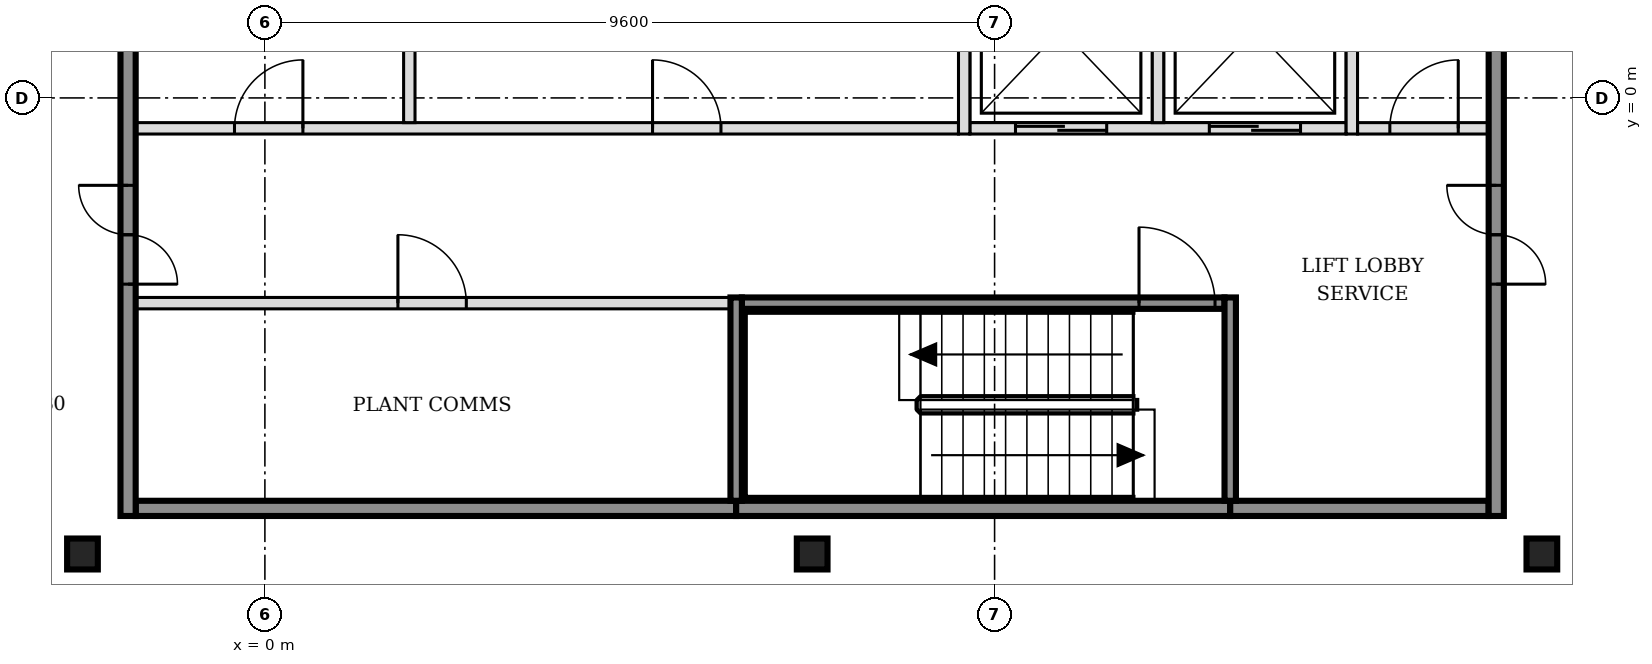
"""IFC4 building model, lengths in metres.
Left out: names, types, materials, properties, quantities, classifications, styles, units other than length and angle.
Written with IfcOpenShell. Run it as: python <this file> out.ifc"""

import sys

from ifc_helpers import new_model, si_unit, direction, frame, frame_2d, origin, origin_2d, place, context, subcontext, project, spatial, rectangle, i_section, extrude, element, fill, save


model = new_model("IFC4")
c1 = context("Model", 3, precision=1e-05, world=origin(), true_north=direction((0.0, 1.0)))
c2 = subcontext(c1, "Body", "Model", "MODEL_VIEW")
j1 = project(units=[si_unit("LENGTHUNIT", "METRE"), si_unit("PLANEANGLEUNIT", "RADIAN")], contexts=[c1])
p1 = place(None, origin())
s1 = spatial("IfcSite", under=j1, at=p1, CompositionType="ELEMENT")
p2 = place(p1, origin())
s2 = spatial("IfcBuilding", under=s1, at=p2, CompositionType="ELEMENT")
p3 = place(p2, frame((0.0, 0.0, 214.2)))
s3 = spatial("IfcBuildingStorey", under=s2, at=p3, CompositionType="ELEMENT", Elevation=214.2)
for number, where, z_axis, x_axis in (
    (1, (-2.4, -6.0, -0.15), (0.0, 0.0, 1.0), (1.0, 0.0, 0.0)),
    (2, (7.2, -6.0, -0.15), (0.0, 0.0, 1.0), (1.0, 0.0, 0.0)),
    (3, (16.8, -6.0, -0.15), (0.0, 0.0, 1.0), (1.0, 0.0, 0.0)),
):
    element("IfcColumn", number, at=place(p3, frame(where, z_axis=z_axis, x_axis=x_axis)), inside=s3, PredefinedType="COLUMN", context=c2, shape_type="SweptSolid", body=[
        extrude(i_section(OverallWidth=0.404, OverallDepth=0.407, WebThickness=0.027, FlangeThickness=0.044, FilletRadius=0.015, at=origin_2d()), origin(), (0.0, 0.0, 1.0), 3.6),
    ])
p4 = place(p3, frame((-1.7, -5.4, 0.0), z_axis=(0.0, 0.0, 1.0), x_axis=(1.0, 0.0, 0.0)))
e4 = element("IfcWall", 4, at=p4, inside=s3, PredefinedType="SOLIDWALL", context=c2, shape_type="SweptSolid", body=[
    extrude(rectangle(XDim=7.9, YDim=0.2, at=frame_2d((3.95, 0.0))), origin(), (0.0, 0.0, 1.0), 3.45),
])
p5 = place(p3, frame((6.2, -5.4, 0.0), z_axis=(0.0, 0.0, 1.0), x_axis=(1.0, 0.0, 0.0)))
e5 = element("IfcWall", 5, at=p5, inside=s3, PredefinedType="SOLIDWALL", context=c2, shape_type="SweptSolid", body=[
    extrude(rectangle(XDim=6.5, YDim=0.2, at=frame_2d((3.25, 0.0))), origin(), (0.0, 0.0, 1.0), 3.45),
])
p6 = place(p3, frame((12.7, -5.4, 0.0), z_axis=(0.0, 0.0, 1.0), x_axis=(1.0, 0.0, 0.0)))
e6 = element("IfcWall", 6, at=p6, inside=s3, PredefinedType="SOLIDWALL", context=c2, shape_type="SweptSolid", body=[
    extrude(rectangle(XDim=3.4, YDim=0.2, at=frame_2d((1.7, 0.0))), origin(), (0.0, 0.0, 1.0), 3.45),
])
p7 = place(p3, frame((-1.7, -2.7, 0.0), z_axis=(0.0, 0.0, 1.0), x_axis=(1.0, 0.0, 0.0)))
e7 = element("IfcWall", 7, at=p7, inside=s3, PredefinedType="PARTITIONING", context=c2, shape_type="SweptSolid", body=[
    extrude(rectangle(XDim=7.825, YDim=0.15, at=frame_2d((3.913, 0.0))), origin(), (0.0, 0.0, 1.0), 3.45),
])
p8 = place(p7, frame((3.45, 0.0, 0.0)))
e8 = element("IfcOpeningElement", 8, at=p8, cuts=e7, PredefinedType="OPENING", context=c2, shape_type="SweptSolid", body=[
    extrude(rectangle(XDim=0.9, YDim=2.1, at=frame_2d((0.45, 1.05))), frame((0.0, 0.085, 0.0), z_axis=(0.0, -1.0, 0.0), x_axis=(1.0, 0.0, 0.0)), (0.0, 0.0, 1.0), 0.17),
])
p9 = place(p3, frame((6.275, -2.7, 0.0), z_axis=(0.0, 0.0, 1.0), x_axis=(1.0, 0.0, 0.0)))
e9 = element("IfcWall", 9, at=p9, inside=s3, PredefinedType="SOLIDWALL", context=c2, shape_type="SweptSolid", body=[
    extrude(rectangle(XDim=6.35, YDim=0.15, at=frame_2d((3.175, 0.0))), origin(), (0.0, 0.0, 1.0), 3.45),
])
p10 = place(p9, frame((5.225, 0.0, 0.0)))
e10 = element("IfcOpeningElement", 10, at=p10, cuts=e9, PredefinedType="OPENING", context=c2, shape_type="SweptSolid", body=[
    extrude(rectangle(XDim=1.0, YDim=2.1, at=frame_2d((0.5, 1.05))), frame((0.0, 0.085, 0.0), z_axis=(0.0, -1.0, 0.0), x_axis=(1.0, 0.0, 0.0)), (0.0, 0.0, 1.0), 0.17),
])
p11 = place(p3, frame((-1.7, -0.4, 0.0), z_axis=(0.0, 0.0, 1.0), x_axis=(1.0, 0.0, 0.0)))
e11 = element("IfcWall", 11, at=p11, inside=s3, PredefinedType="PARTITIONING", context=c2, shape_type="SweptSolid", body=[
    extrude(rectangle(XDim=10.825, YDim=0.15, at=frame_2d((5.413, 0.0))), origin(), (0.0, 0.0, 1.0), 3.45),
])
p12 = place(p11, frame((1.3, 0.0, 0.0)))
e12 = element("IfcOpeningElement", 12, at=p12, cuts=e11, PredefinedType="OPENING", context=c2, shape_type="SweptSolid", body=[
    extrude(rectangle(XDim=0.9, YDim=2.1, at=frame_2d((0.45, 1.05))), frame((0.0, 0.085, 0.0), z_axis=(0.0, -1.0, 0.0), x_axis=(1.0, 0.0, 0.0)), (0.0, 0.0, 1.0), 0.17),
])
p13 = place(p11, frame((6.8, 0.0, 0.0)))
e13 = element("IfcOpeningElement", 13, at=p13, cuts=e11, PredefinedType="OPENING", context=c2, shape_type="SweptSolid", body=[
    extrude(rectangle(XDim=0.9, YDim=2.1, at=frame_2d((0.45, 1.05))), frame((0.0, 0.085, 0.0), z_axis=(0.0, -1.0, 0.0), x_axis=(1.0, 0.0, 0.0)), (0.0, 0.0, 1.0), 0.17),
])
p14 = place(p3, frame((9.275, -0.4, 0.0), z_axis=(0.0, 0.0, 1.0), x_axis=(1.0, 0.0, 0.0)))
e14 = element("IfcWall", 14, at=p14, inside=s3, PredefinedType="SOLIDWALL", context=c2, shape_type="SweptSolid", body=[
    extrude(rectangle(XDim=4.95, YDim=0.15, at=frame_2d((2.475, 0.0))), origin(), (0.0, 0.0, 1.0), 3.45),
])
p15 = place(p14, frame((0.6, 0.0, 0.0)))
e15 = element("IfcOpeningElement", 15, at=p15, cuts=e14, PredefinedType="OPENING", context=c2, shape_type="SweptSolid", body=[
    extrude(rectangle(XDim=1.2, YDim=2.1, at=frame_2d((0.6, 1.05))), frame((0.0, 0.085, 0.0), z_axis=(0.0, -1.0, 0.0), x_axis=(1.0, 0.0, 0.0)), (0.0, 0.0, 1.0), 0.17),
])
p16 = place(p14, frame((3.15, 0.0, 0.0)))
e16 = element("IfcOpeningElement", 16, at=p16, cuts=e14, PredefinedType="OPENING", context=c2, shape_type="SweptSolid", body=[
    extrude(rectangle(XDim=1.2, YDim=2.1, at=frame_2d((0.6, 1.05))), frame((0.0, 0.085, 0.0), z_axis=(0.0, -1.0, 0.0), x_axis=(1.0, 0.0, 0.0)), (0.0, 0.0, 1.0), 0.17),
])
p17 = place(p3, frame((14.375, -0.4, 0.0), z_axis=(0.0, 0.0, 1.0), x_axis=(1.0, 0.0, 0.0)))
e17 = element("IfcWall", 17, at=p17, inside=s3, PredefinedType="PARTITIONING", context=c2, shape_type="SweptSolid", body=[
    extrude(rectangle(XDim=1.725, YDim=0.15, at=frame_2d((0.863, 0.0))), origin(), (0.0, 0.0, 1.0), 3.45),
])
p18 = place(p17, frame((0.425, 0.0, 0.0)))
e18 = element("IfcOpeningElement", 18, at=p18, cuts=e17, PredefinedType="OPENING", context=c2, shape_type="SweptSolid", body=[
    extrude(rectangle(XDim=0.9, YDim=2.1, at=frame_2d((0.45, 1.05))), frame((0.0, 0.085, 0.0), z_axis=(0.0, -1.0, 0.0), x_axis=(1.0, 0.0, 0.0)), (0.0, 0.0, 1.0), 0.17),
])
p19 = place(p3, frame((-1.8, -5.5, 0.0), z_axis=(0.0, 0.0, 1.0), x_axis=(0.0, 1.0, 0.0)))
e19 = element("IfcWall", 19, at=p19, inside=s3, PredefinedType="SOLIDWALL", context=c2, shape_type="SweptSolid", body=[
    extrude(rectangle(XDim=15.8, YDim=0.2, at=frame_2d((7.9, 0.0))), origin(), (0.0, 0.0, 1.0), 3.45),
])
p20 = place(p19, frame((3.05, 0.0, 0.0)))
e20 = element("IfcOpeningElement", 20, at=p20, cuts=e19, PredefinedType="OPENING", context=c2, shape_type="SweptSolid", body=[
    extrude(rectangle(XDim=1.3, YDim=2.1, at=frame_2d((0.65, 1.05))), frame((0.0, 0.11, 0.0), z_axis=(0.0, -1.0, 0.0), x_axis=(1.0, 0.0, 0.0)), (0.0, 0.0, 1.0), 0.22),
])
p21 = place(p19, frame((11.45, 0.0, 0.0)))
e21 = element("IfcOpeningElement", 21, at=p21, cuts=e19, PredefinedType="OPENING", context=c2, shape_type="SweptSolid", body=[
    extrude(rectangle(XDim=1.3, YDim=2.1, at=frame_2d((0.65, 1.05))), frame((0.0, 0.11, 0.0), z_axis=(0.0, -1.0, 0.0), x_axis=(1.0, 0.0, 0.0)), (0.0, 0.0, 1.0), 0.22),
])
p22 = place(p3, frame((1.9, -0.325, 0.0), z_axis=(0.0, 0.0, 1.0), x_axis=(0.0, 1.0, 0.0)))
e22 = element("IfcWall", 22, at=p22, inside=s3, PredefinedType="PARTITIONING", context=c2, shape_type="SweptSolid", body=[
    extrude(rectangle(XDim=2.45, YDim=0.15, at=frame_2d((1.225, 0.0))), origin(), (0.0, 0.0, 1.0), 3.45),
])
p23 = place(p3, frame((6.2, -5.3, 0.0), z_axis=(0.0, 0.0, 1.0), x_axis=(0.0, 1.0, 0.0)))
e23 = element("IfcWall", 23, at=p23, inside=s3, PredefinedType="SOLIDWALL", context=c2, shape_type="SweptSolid", body=[
    extrude(rectangle(XDim=2.675, YDim=0.15, at=frame_2d((1.337, 0.0))), origin(), (0.0, 0.0, 1.0), 3.45),
])
p24 = place(p3, frame((9.2, -0.475, 0.0), z_axis=(0.0, 0.0, 1.0), x_axis=(0.0, 1.0, 0.0)))
e24 = element("IfcWall", 24, at=p24, inside=s3, PredefinedType="SOLIDWALL", context=c2, shape_type="SweptSolid", body=[
    extrude(rectangle(XDim=2.6, YDim=0.15, at=frame_2d((1.3, 0.0))), origin(), (0.0, 0.0, 1.0), 3.45),
])
p25 = place(p3, frame((11.75, -0.325, 0.0), z_axis=(0.0, 0.0, 1.0), x_axis=(0.0, 1.0, 0.0)))
e25 = element("IfcWall", 25, at=p25, inside=s3, PredefinedType="SOLIDWALL", context=c2, shape_type="SweptSolid", body=[
    extrude(rectangle(XDim=2.45, YDim=0.15, at=frame_2d((1.225, 0.0))), origin(), (0.0, 0.0, 1.0), 3.45),
])
p26 = place(p3, frame((12.7, -5.3, 0.0), z_axis=(0.0, 0.0, 1.0), x_axis=(0.0, 1.0, 0.0)))
e26 = element("IfcWall", 26, at=p26, inside=s3, PredefinedType="SOLIDWALL", context=c2, shape_type="SweptSolid", body=[
    extrude(rectangle(XDim=2.675, YDim=0.15, at=frame_2d((1.337, 0.0))), origin(), (0.0, 0.0, 1.0), 3.45),
])
p27 = place(p3, frame((14.3, -0.475, 0.0), z_axis=(0.0, 0.0, 1.0), x_axis=(0.0, 1.0, 0.0)))
e27 = element("IfcWall", 27, at=p27, inside=s3, PredefinedType="SOLIDWALL", context=c2, shape_type="SweptSolid", body=[
    extrude(rectangle(XDim=2.75, YDim=0.15, at=frame_2d((1.375, 0.0))), origin(), (0.0, 0.0, 1.0), 3.45),
])
p28 = place(p3, frame((16.2, -5.5, 0.0), z_axis=(0.0, 0.0, 1.0), x_axis=(0.0, 1.0, 0.0)))
e28 = element("IfcWall", 28, at=p28, inside=s3, PredefinedType="SOLIDWALL", context=c2, shape_type="SweptSolid", body=[
    extrude(rectangle(XDim=15.8, YDim=0.2, at=frame_2d((7.9, 0.0))), origin(), (0.0, 0.0, 1.0), 3.45),
])
p29 = place(p28, frame((3.05, 0.0, 0.0)))
e29 = element("IfcOpeningElement", 29, at=p29, cuts=e28, PredefinedType="OPENING", context=c2, shape_type="SweptSolid", body=[
    extrude(rectangle(XDim=1.3, YDim=2.1, at=frame_2d((0.65, 1.05))), frame((0.0, 0.11, 0.0), z_axis=(0.0, -1.0, 0.0), x_axis=(1.0, 0.0, 0.0)), (0.0, 0.0, 1.0), 0.22),
])
p30 = place(p28, frame((11.45, 0.0, 0.0)))
e30 = element("IfcOpeningElement", 30, at=p30, cuts=e28, PredefinedType="OPENING", context=c2, shape_type="SweptSolid", body=[
    extrude(rectangle(XDim=1.3, YDim=2.1, at=frame_2d((0.65, 1.05))), frame((0.0, 0.11, 0.0), z_axis=(0.0, -1.0, 0.0), x_axis=(1.0, 0.0, 0.0)), (0.0, 0.0, 1.0), 0.22),
])
p31 = place(p15, origin())
e31 = element("IfcDoor", 31, at=p31, inside=s3, OperationType="DOUBLE_DOOR_SLIDING", PredefinedType="DOOR", context=c2, shape_type="SweptSolid", body=[
    extrude(rectangle(XDim=1.2, YDim=2.1, at=frame_2d((0.6, 1.05))), frame((0.0, 0.025, 0.0), z_axis=(0.0, -1.0, 0.0), x_axis=(1.0, 0.0, 0.0)), (0.0, 0.0, 1.0), 0.05),
])
fill(e15, e31)
p32 = place(p16, origin())
e32 = element("IfcDoor", 32, at=p32, inside=s3, OperationType="DOUBLE_DOOR_SLIDING", PredefinedType="DOOR", context=c2, shape_type="SweptSolid", body=[
    extrude(rectangle(XDim=1.2, YDim=2.1, at=frame_2d((0.6, 1.05))), frame((0.0, 0.025, 0.0), z_axis=(0.0, -1.0, 0.0), x_axis=(1.0, 0.0, 0.0)), (0.0, 0.0, 1.0), 0.05),
])
fill(e16, e32)
p33 = place(p10, origin())
e33 = element("IfcDoor", 33, at=p33, inside=s3, OperationType="SINGLE_SWING_LEFT", PredefinedType="DOOR", context=c2, shape_type="SweptSolid", body=[
    extrude(rectangle(XDim=1.0, YDim=2.1, at=frame_2d((0.5, 1.05))), frame((0.0, 0.025, 0.0), z_axis=(0.0, -1.0, 0.0), x_axis=(1.0, 0.0, 0.0)), (0.0, 0.0, 1.0), 0.05),
])
fill(e10, e33)
p34 = place(p20, origin())
e34 = element("IfcDoor", 34, at=p34, inside=s3, OperationType="DOUBLE_DOOR_SINGLE_SWING", PredefinedType="DOOR", context=c2, shape_type="SweptSolid", body=[
    extrude(rectangle(XDim=1.3, YDim=2.1, at=frame_2d((0.65, 1.05))), frame((0.0, 0.025, 0.0), z_axis=(0.0, -1.0, 0.0), x_axis=(1.0, 0.0, 0.0)), (0.0, 0.0, 1.0), 0.05),
])
fill(e20, e34)
p35 = place(p29, origin())
e35 = element("IfcDoor", 35, at=p35, inside=s3, OperationType="DOUBLE_DOOR_SINGLE_SWING", PredefinedType="DOOR", context=c2, shape_type="SweptSolid", body=[
    extrude(rectangle(XDim=1.3, YDim=2.1, at=frame_2d((0.65, 1.05))), frame((0.0, 0.025, 0.0), z_axis=(0.0, -1.0, 0.0), x_axis=(1.0, 0.0, 0.0)), (0.0, 0.0, 1.0), 0.05),
])
fill(e29, e35)
p36 = place(p18, origin())
e36 = element("IfcDoor", 36, at=p36, inside=s3, OperationType="SINGLE_SWING_RIGHT", PredefinedType="DOOR", context=c2, shape_type="SweptSolid", body=[
    extrude(rectangle(XDim=0.9, YDim=2.1, at=frame_2d((0.45, 1.05))), frame((0.0, 0.025, 0.0), z_axis=(0.0, -1.0, 0.0), x_axis=(1.0, 0.0, 0.0)), (0.0, 0.0, 1.0), 0.05),
])
fill(e18, e36)
p37 = place(p8, origin())
e37 = element("IfcDoor", 37, at=p37, inside=s3, OperationType="SINGLE_SWING_LEFT", PredefinedType="DOOR", context=c2, shape_type="SweptSolid", body=[
    extrude(rectangle(XDim=0.9, YDim=2.1, at=frame_2d((0.45, 1.05))), frame((0.0, 0.025, 0.0), z_axis=(0.0, -1.0, 0.0), x_axis=(1.0, 0.0, 0.0)), (0.0, 0.0, 1.0), 0.05),
])
fill(e8, e37)
p38 = place(p12, origin())
e38 = element("IfcDoor", 38, at=p38, inside=s3, OperationType="SINGLE_SWING_RIGHT", PredefinedType="DOOR", context=c2, shape_type="SweptSolid", body=[
    extrude(rectangle(XDim=0.9, YDim=2.1, at=frame_2d((0.45, 1.05))), frame((0.0, 0.025, 0.0), z_axis=(0.0, -1.0, 0.0), x_axis=(1.0, 0.0, 0.0)), (0.0, 0.0, 1.0), 0.05),
])
fill(e12, e38)
p39 = place(p13, origin())
e39 = element("IfcDoor", 39, at=p39, inside=s3, OperationType="SINGLE_SWING_LEFT", PredefinedType="DOOR", context=c2, shape_type="SweptSolid", body=[
    extrude(rectangle(XDim=0.9, YDim=2.1, at=frame_2d((0.45, 1.05))), frame((0.0, 0.025, 0.0), z_axis=(0.0, -1.0, 0.0), x_axis=(1.0, 0.0, 0.0)), (0.0, 0.0, 1.0), 0.05),
])
fill(e13, e39)
save(model, sys.argv[1])
